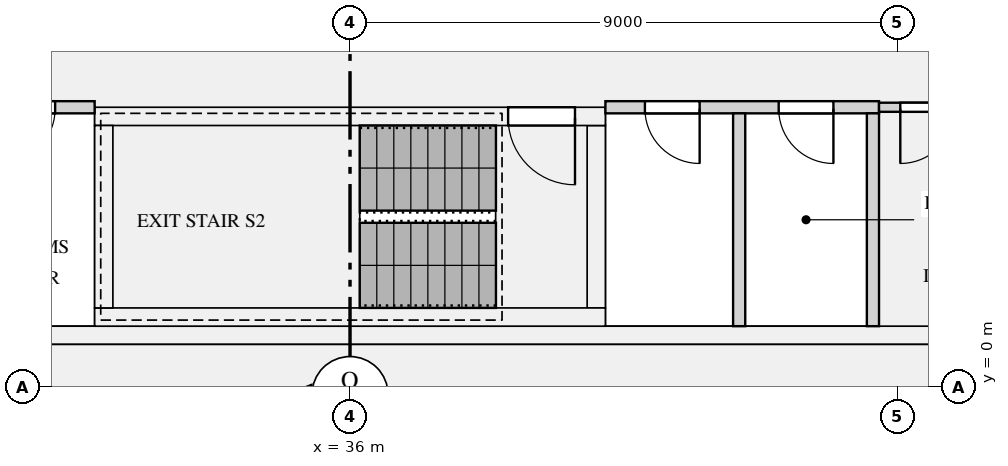
"""IFC4 building model, lengths in metres.
Left out: names, types, materials, properties, quantities, classifications, styles, units other than length and angle.
Written with IfcOpenShell. Run it as: python <this file> out.ifc"""

import sys

from ifc_helpers import new_model, si_unit, direction, frame, frame_2d, origin, place, context, subcontext, project, spatial, rectangle, extrude, element, fill, save


model = new_model("IFC4")
c1 = context("Model", 3, precision=1e-05, world=origin(), true_north=direction((0.0, 1.0)))
c2 = subcontext(c1, "Body", "Model", "MODEL_VIEW")
j1 = project(units=[si_unit("LENGTHUNIT", "METRE"), si_unit("PLANEANGLEUNIT", "RADIAN")], contexts=[c1])
p1 = place(None, origin())
s1 = spatial("IfcSite", under=j1, at=p1, CompositionType="ELEMENT")
p2 = place(p1, origin())
s2 = spatial("IfcBuilding", under=s1, at=p2, CompositionType="ELEMENT")
p3 = place(p2, frame((0.0, 0.0, 141.3)))
s3 = spatial("IfcBuildingStorey", under=s2, at=p3, CompositionType="ELEMENT", Elevation=141.3)
p4 = place(p3, frame((18.7, 0.35, 0.0), z_axis=(0.0, 0.0, 1.0), x_axis=(1.0, 0.0, 0.0)))
e1 = element("IfcWall", 1, at=p4, inside=s3, PredefinedType="SHEAR", context=c2, shape_type="SweptSolid", body=[
    extrude(rectangle(XDim=34.6, YDim=0.7, at=frame_2d((17.3, 0.0))), origin(), (0.0, 0.0, 1.0), 3.15),
])
p5 = place(p3, frame((18.7, 0.85, 0.0), z_axis=(0.0, 0.0, 1.0), x_axis=(1.0, 0.0, 0.0)))
e2 = element("IfcWall", 2, at=p5, inside=s3, PredefinedType="SHEAR", context=c2, shape_type="SweptSolid", body=[
    extrude(rectangle(XDim=34.6, YDim=0.3, at=frame_2d((17.3, 0.0))), origin(), (0.0, 0.0, 1.0), 3.15),
])
p6 = place(p3, frame((31.8, 1.15, 0.0), z_axis=(0.0, 0.0, 1.0), x_axis=(1.0, 0.0, 0.0)))
e3 = element("IfcWall", 3, at=p6, inside=s3, PredefinedType="SHEAR", context=c2, shape_type="SweptSolid", body=[
    extrude(rectangle(XDim=8.4, YDim=0.3, at=frame_2d((4.2, 0.0))), origin(), (0.0, 0.0, 1.0), 3.15),
])
p7 = place(p3, frame((31.8, 4.45, 0.0), z_axis=(0.0, 0.0, 1.0), x_axis=(1.0, 0.0, 0.0)))
e4 = element("IfcWall", 4, at=p7, inside=s3, PredefinedType="SHEAR", context=c2, shape_type="SweptSolid", body=[
    extrude(rectangle(XDim=8.4, YDim=0.3, at=frame_2d((4.2, 0.0))), origin(), (0.0, 0.0, 1.0), 3.15),
])
p8 = place(p7, frame((6.8, 0.0, 0.0)))
e5 = element("IfcOpeningElement", 5, at=p8, cuts=e4, PredefinedType="OPENING", context=c2, shape_type="SweptSolid", body=[
    extrude(rectangle(XDim=1.1, YDim=2.1, at=frame_2d((0.55, 1.05))), frame((0.0, 0.16, 0.0), z_axis=(0.0, -1.0, 0.0), x_axis=(1.0, 0.0, 0.0)), (0.0, 0.0, 1.0), 0.32),
])
for number, where, z_axis, x_axis in (
    (6, (31.95, 1.3, 0.0), (0.0, 0.0, 1.0), (0.0, 1.0, 0.0)),
    (7, (40.05, 1.3, 0.0), (0.0, 0.0, 1.0), (0.0, 1.0, 0.0)),
):
    element("IfcWall", number, at=place(p3, frame(where, z_axis=z_axis, x_axis=x_axis)), inside=s3, PredefinedType="SHEAR", context=c2, shape_type="SweptSolid", body=[
        extrude(rectangle(XDim=3.0, YDim=0.3, at=frame_2d((1.5, 0.0))), origin(), (0.0, 0.0, 1.0), 3.15),
    ])
p9 = place(p3, frame((27.3, 4.6, 0.0), z_axis=(0.0, 0.0, 1.0), x_axis=(1.0, 0.0, 0.0)))
e8 = element("IfcWall", 8, at=p9, inside=s3, PredefinedType="PARTITIONING", context=c2, shape_type="SweptSolid", body=[
    extrude(rectangle(XDim=4.5, YDim=0.2, at=frame_2d((2.25, 0.0))), origin(), (0.0, 0.0, 1.0), 2.83),
])
p10 = place(p9, frame((0.75, 0.0, 0.0)))
e9 = element("IfcOpeningElement", 9, at=p10, cuts=e8, PredefinedType="OPENING", context=c2, shape_type="SweptSolid", body=[
    extrude(rectangle(XDim=0.9, YDim=2.1, at=frame_2d((0.45, 1.05))), frame((0.0, 0.11, 0.0), z_axis=(0.0, -1.0, 0.0), x_axis=(1.0, 0.0, 0.0)), (0.0, 0.0, 1.0), 0.22),
])
p11 = place(p9, frame((2.95, 0.0, 0.0)))
e10 = element("IfcOpeningElement", 10, at=p11, cuts=e8, PredefinedType="OPENING", context=c2, shape_type="SweptSolid", body=[
    extrude(rectangle(XDim=0.9, YDim=2.1, at=frame_2d((0.45, 1.05))), frame((0.0, 0.11, 0.0), z_axis=(0.0, -1.0, 0.0), x_axis=(1.0, 0.0, 0.0)), (0.0, 0.0, 1.0), 0.22),
])
p12 = place(p3, frame((40.2, 4.6, 0.0), z_axis=(0.0, 0.0, 1.0), x_axis=(1.0, 0.0, 0.0)))
e11 = element("IfcWall", 11, at=p12, inside=s3, PredefinedType="PARTITIONING", context=c2, shape_type="SweptSolid", body=[
    extrude(rectangle(XDim=4.5, YDim=0.2, at=frame_2d((2.25, 0.0))), origin(), (0.0, 0.0, 1.0), 2.83),
])
p13 = place(p12, frame((0.65, 0.0, 0.0)))
e12 = element("IfcOpeningElement", 12, at=p13, cuts=e11, PredefinedType="OPENING", context=c2, shape_type="SweptSolid", body=[
    extrude(rectangle(XDim=0.9, YDim=2.1, at=frame_2d((0.45, 1.05))), frame((0.0, 0.11, 0.0), z_axis=(0.0, -1.0, 0.0), x_axis=(1.0, 0.0, 0.0)), (0.0, 0.0, 1.0), 0.22),
])
p14 = place(p12, frame((2.85, 0.0, 0.0)))
e13 = element("IfcOpeningElement", 13, at=p14, cuts=e11, PredefinedType="OPENING", context=c2, shape_type="SweptSolid", body=[
    extrude(rectangle(XDim=0.9, YDim=2.1, at=frame_2d((0.45, 1.05))), frame((0.0, 0.11, 0.0), z_axis=(0.0, -1.0, 0.0), x_axis=(1.0, 0.0, 0.0)), (0.0, 0.0, 1.0), 0.22),
])
p15 = place(p3, frame((44.7, 4.6, 0.0), z_axis=(0.0, 0.0, 1.0), x_axis=(1.0, 0.0, 0.0)))
e14 = element("IfcWall", 14, at=p15, inside=s3, PredefinedType="PARTITIONING", context=c2, shape_type="SweptSolid", body=[
    extrude(rectangle(XDim=2.675, YDim=0.15, at=frame_2d((1.337, 0.0))), origin(), (0.0, 0.0, 1.0), 2.83),
])
p16 = place(p15, frame((0.35, 0.0, 0.0)))
e15 = element("IfcOpeningElement", 15, at=p16, cuts=e14, PredefinedType="OPENING", context=c2, shape_type="SweptSolid", body=[
    extrude(rectangle(XDim=0.9, YDim=2.1, at=frame_2d((0.45, 1.05))), frame((0.0, 0.085, 0.0), z_axis=(0.0, -1.0, 0.0), x_axis=(1.0, 0.0, 0.0)), (0.0, 0.0, 1.0), 0.17),
])
for number, where, z_axis, x_axis in (
    (16, (42.4, 1.0, 0.0), (0.0, 0.0, 1.0), (0.0, 1.0, 0.0)),
    (17, (44.6, 1.0, 0.0), (0.0, 0.0, 1.0), (0.0, 1.0, 0.0)),
):
    element("IfcWall", number, at=place(p3, frame(where, z_axis=z_axis, x_axis=x_axis)), inside=s3, PredefinedType="PARTITIONING", context=c2, shape_type="SweptSolid", body=[
        extrude(rectangle(XDim=3.5, YDim=0.2, at=frame_2d((1.75, 0.0))), origin(), (0.0, 0.0, 1.0), 2.83),
    ])
p17 = place(p8, frame((1.1, 0.0, 0.0), z_axis=(0.0, 0.0, 1.0), x_axis=(-1.0, 0.0, 0.0)))
e18 = element("IfcDoor", 18, at=p17, inside=s3, OperationType="SINGLE_SWING_LEFT", PredefinedType="DOOR", context=c2, shape_type="SweptSolid", body=[
    extrude(rectangle(XDim=1.1, YDim=2.1, at=frame_2d((0.55, 1.05))), frame((0.0, 0.025, 0.0), z_axis=(0.0, -1.0, 0.0), x_axis=(1.0, 0.0, 0.0)), (0.0, 0.0, 1.0), 0.05),
])
fill(e5, e18)
p18 = place(p16, frame((0.9, 0.0, 0.0), z_axis=(0.0, 0.0, 1.0), x_axis=(-1.0, 0.0, 0.0)))
e19 = element("IfcDoor", 19, at=p18, inside=s3, OperationType="SINGLE_SWING_RIGHT", PredefinedType="DOOR", context=c2, shape_type="SweptSolid", body=[
    extrude(rectangle(XDim=0.9, YDim=2.1, at=frame_2d((0.45, 1.05))), frame((0.0, 0.025, 0.0), z_axis=(0.0, -1.0, 0.0), x_axis=(1.0, 0.0, 0.0)), (0.0, 0.0, 1.0), 0.05),
])
fill(e15, e19)
p19 = place(p11, frame((0.9, 0.0, 0.0), z_axis=(0.0, 0.0, 1.0), x_axis=(-1.0, 0.0, 0.0)))
e20 = element("IfcDoor", 20, at=p19, inside=s3, OperationType="SINGLE_SWING_RIGHT", PredefinedType="DOOR", context=c2, shape_type="SweptSolid", body=[
    extrude(rectangle(XDim=0.9, YDim=2.1, at=frame_2d((0.45, 1.05))), frame((0.0, 0.025, 0.0), z_axis=(0.0, -1.0, 0.0), x_axis=(1.0, 0.0, 0.0)), (0.0, 0.0, 1.0), 0.05),
])
fill(e10, e20)
p20 = place(p13, frame((0.9, 0.0, 0.0), z_axis=(0.0, 0.0, 1.0), x_axis=(-1.0, 0.0, 0.0)))
e21 = element("IfcDoor", 21, at=p20, inside=s3, OperationType="SINGLE_SWING_LEFT", PredefinedType="DOOR", context=c2, shape_type="SweptSolid", body=[
    extrude(rectangle(XDim=0.9, YDim=2.1, at=frame_2d((0.45, 1.05))), frame((0.0, 0.025, 0.0), z_axis=(0.0, -1.0, 0.0), x_axis=(1.0, 0.0, 0.0)), (0.0, 0.0, 1.0), 0.05),
])
fill(e12, e21)
p21 = place(p14, frame((0.9, 0.0, 0.0), z_axis=(0.0, 0.0, 1.0), x_axis=(-1.0, 0.0, 0.0)))
e22 = element("IfcDoor", 22, at=p21, inside=s3, OperationType="SINGLE_SWING_LEFT", PredefinedType="DOOR", context=c2, shape_type="SweptSolid", body=[
    extrude(rectangle(XDim=0.9, YDim=2.1, at=frame_2d((0.45, 1.05))), frame((0.0, 0.025, 0.0), z_axis=(0.0, -1.0, 0.0), x_axis=(1.0, 0.0, 0.0)), (0.0, 0.0, 1.0), 0.05),
])
fill(e13, e22)
save(model, sys.argv[1])
